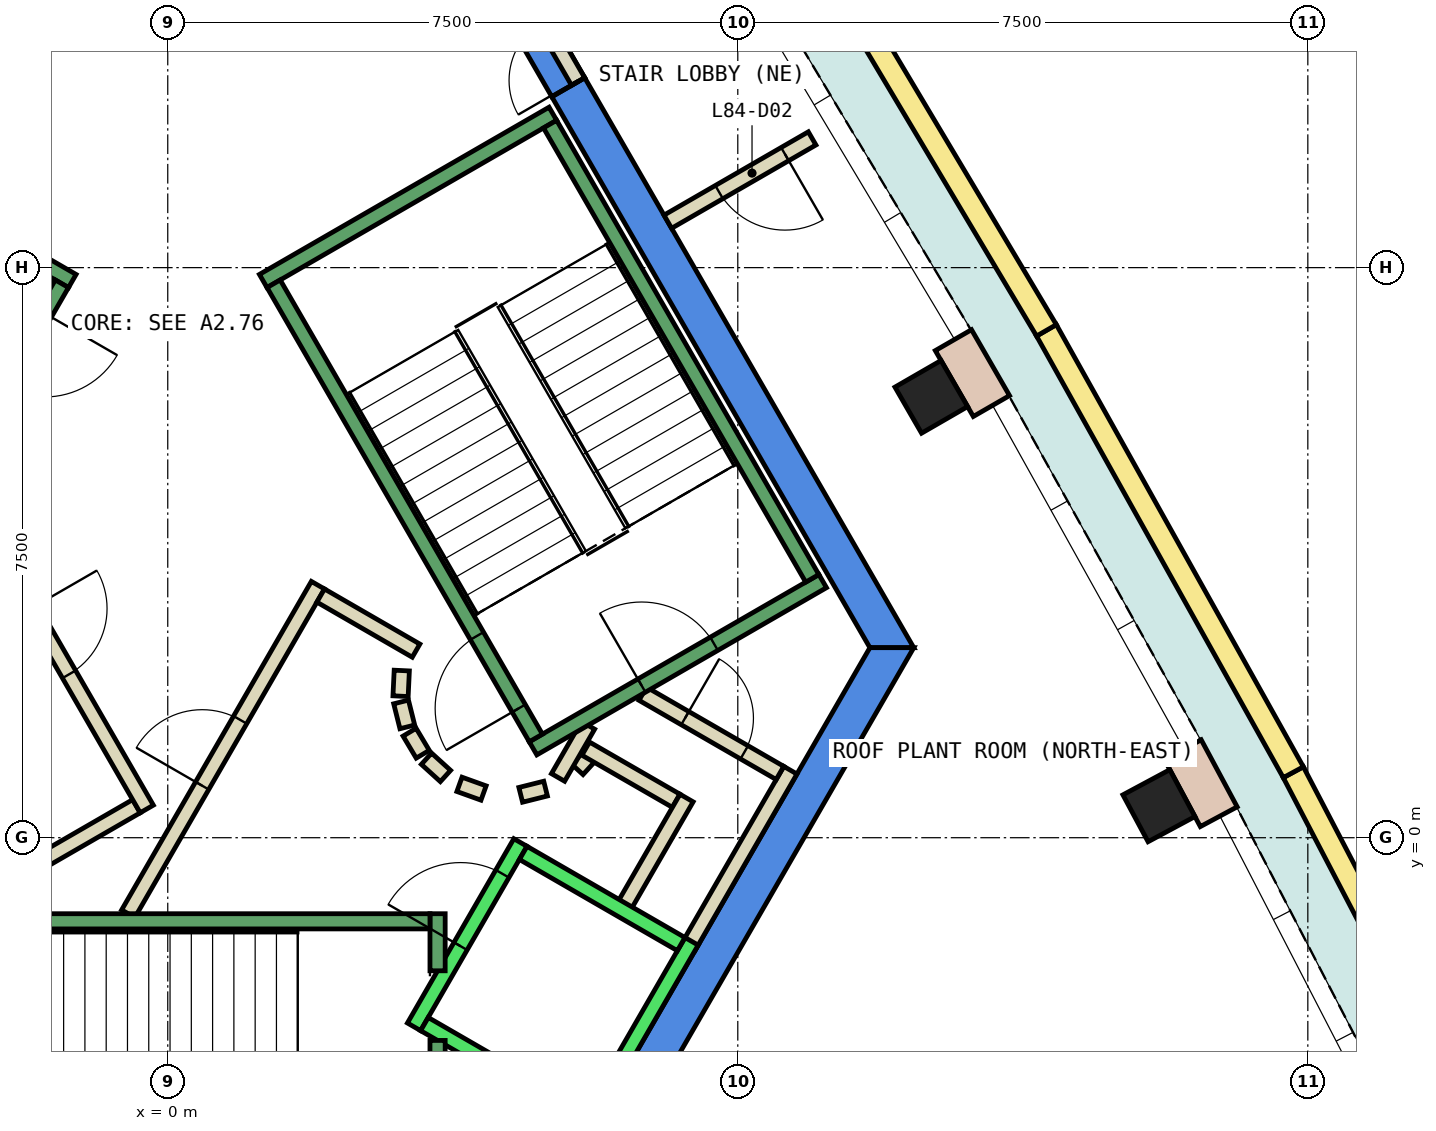
"""IFC4 building model, lengths in metres.
Left out: names, types, materials, properties, quantities, classifications, styles, units other than length and angle.
Written with IfcOpenShell. Run it as: python <this file> out.ifc"""

import sys

from ifc_helpers import new_model, si_unit, direction, frame, frame_2d, origin, origin_2d, place, context, subcontext, project, spatial, polyline, rectangle, outline, extrude, element, fill, save


model = new_model("IFC4")
c1 = context("Model", 3, precision=1e-05, world=origin(), true_north=direction((0.0, 1.0)))
c2 = subcontext(c1, "Body", "Model", "MODEL_VIEW")
j1 = project(units=[si_unit("LENGTHUNIT", "METRE"), si_unit("PLANEANGLEUNIT", "RADIAN")], contexts=[c1])
p1 = place(None, origin())
s1 = spatial("IfcSite", under=j1, at=p1, CompositionType="ELEMENT")
p2 = place(p1, origin())
s2 = spatial("IfcBuilding", under=s1, at=p2, CompositionType="ELEMENT")
p3 = place(p2, frame((0.0, 0.0, 358.4)))
s3 = spatial("IfcBuildingStorey", under=s2, at=p3, CompositionType="ELEMENT", Elevation=358.4)
for number, where, z_axis, x_axis in (
    (1, (13.041, 0.421, 0.0), (0.0, 0.0, 1.0), (-0.473, 0.881, 0.0)),
    (2, (10.046, 5.8, 0.0), (0.0, 0.0, 1.0), (-0.5, 0.866, 0.0)),
):
    element("IfcColumn", number, at=place(p3, frame(where, z_axis=z_axis, x_axis=x_axis)), inside=s3, PredefinedType="COLUMN", context=c2, shape_type="SweptSolid", body=[
        extrude(rectangle(XDim=0.7, YDim=0.7, at=origin_2d()), origin(), (0.0, 0.0, 1.0), 4.05),
    ])
p4 = place(p3, frame((0.0, 0.0, -0.45)))
e3 = element("IfcWall", 3, at=p4, inside=s3, PredefinedType="SHEAR", context=c2, shape_type="SweptSolid", body=[
    extrude(outline(polyline([(5.486, 9.998), (5.053, 9.748), (9.238, 2.5), (9.815, 2.5), (5.486, 9.998)])), origin(), (0.0, 0.0, 1.0), 4.5),
])
p5 = place(p3, frame((0.0, 0.0, 3.6)))
e4 = element("IfcWall", 4, at=p5, inside=s3, PredefinedType="SHEAR", context=c2, shape_type="SweptSolid", body=[
    extrude(outline(polyline([(5.022, 10.8), (4.677, 10.601), (4.619, 10.5), (5.053, 9.748), (5.486, 9.998), (5.022, 10.8)])), origin(), (0.0, 0.0, 1.0), 0.45),
])
p6 = place(p3, frame((0.0, 0.0, -0.45)))
e5 = element("IfcWall", 5, at=p6, inside=s3, PredefinedType="SHEAR", context=c2, shape_type="SweptSolid", body=[
    extrude(outline(polyline([(4.907, -6.0), (9.815, 2.5), (9.238, 2.5), (4.619, -5.5), (4.907, -6.0)])), origin(), (0.0, 0.0, 1.0), 4.5),
])
for number, where, z_axis, x_axis in (
    (6, (13.828, 0.276, 0.0), (0.0, 0.0, 1.0), (-0.472, 0.881, 0.0)),
    (7, (10.837, 5.679, 0.0), (0.0, 0.0, 1.0), (-0.5, 0.866, 0.0)),
):
    element("IfcWall", number, at=place(p3, frame(where, z_axis=z_axis, x_axis=x_axis)), inside=s3, PredefinedType="STANDARD", context=c2, shape_type="SweptSolid", body=[
        extrude(rectangle(XDim=1.001, YDim=0.55, at=frame_2d((0.5, 0.0))), origin(), (0.0, 0.0, 1.0), 4.05),
    ])
p7 = place(p3, origin())
e8 = element("IfcWall", 8, at=p7, inside=s3, PredefinedType="PARAPET", context=c2, shape_type="SweptSolid", body=[
    extrude(outline(polyline([(18.024, -4.974), (14.941, 0.933), (14.677, 0.79), (17.722, -5.044), (18.024, -4.974)])), origin(), (0.0, 0.0, 1.0), 1.1),
])
p8 = place(p3, origin())
e9 = element("IfcWall", 9, at=p8, inside=s3, PredefinedType="PARAPET", context=c2, shape_type="SweptSolid", body=[
    extrude(outline(polyline([(14.941, 0.933), (11.691, 6.75), (11.431, 6.6), (14.677, 0.79), (14.941, 0.933)])), origin(), (0.0, 0.0, 1.0), 1.1),
])
p9 = place(p3, origin())
e10 = element("IfcWall", 10, at=p9, inside=s3, PredefinedType="PARAPET", context=c2, shape_type="SweptSolid", body=[
    extrude(outline(polyline([(11.691, 6.75), (8.278, 12.473), (8.023, 12.316), (11.431, 6.6), (11.691, 6.75)])), origin(), (0.0, 0.0, 1.0), 1.1),
])
p10 = place(p3, frame((5.39, 0.898, 0.0), z_axis=(0.0, 0.0, 1.0), x_axis=(0.673828488714, 0.738887791073, 0.0)))
e11 = element("IfcWall", 11, at=p10, inside=s3, PredefinedType="PARTITIONING", context=c2, shape_type="SweptSolid", body=[
    extrude(rectangle(XDim=0.263, YDim=0.2, at=frame_2d((0.131, 0.0))), origin(), (0.0, 0.0, 1.0), 4.05),
])
p11 = place(p3, frame((5.499, 1.172, 0.0), z_axis=(0.0, 0.0, 1.0), x_axis=(0.866333505267, -0.499465972466, 0.0)))
e12 = element("IfcWall", 12, at=p11, inside=s3, PredefinedType="PARTITIONING", context=c2, shape_type="SweptSolid", body=[
    extrude(rectangle(XDim=1.374, YDim=0.2, at=frame_2d((0.687, 0.0))), origin(), (0.0, 0.0, 1.0), 4.05),
])
p12 = place(p3, frame((6.826, 0.522, 0.0), z_axis=(0.0, 0.0, 1.0), x_axis=(-0.500016722714, -0.866015748706, 0.0)))
e13 = element("IfcWall", 13, at=p12, inside=s3, PredefinedType="PARTITIONING", context=c2, shape_type="SweptSolid", body=[
    extrude(rectangle(XDim=1.7, YDim=0.2, at=frame_2d((0.85, 0.0))), origin(), (0.0, 0.0, 1.0), 4.05),
])
p13 = place(p3, frame((8.192, 0.888, 0.0), z_axis=(0.0, 0.0, 1.0), x_axis=(-0.499940625693, -0.866059680843, 0.0)))
e14 = element("IfcWall", 14, at=p13, inside=s3, PredefinedType="PARTITIONING", context=c2, shape_type="SweptSolid", body=[
    extrude(rectangle(XDim=2.68, YDim=0.2, at=frame_2d((1.34, 0.0))), origin(), (0.0, 0.0, 1.0), 4.05),
])
p14 = place(p3, frame((5.135, 0.793, 0.0), z_axis=(0.0, 0.0, 1.0), x_axis=(0.499526442893, 0.866298639529, 0.0)))
e15 = element("IfcWall", 15, at=p14, inside=s3, PredefinedType="PARTITIONING", context=c2, shape_type="SweptSolid", body=[
    extrude(rectangle(XDim=0.791, YDim=0.2, at=frame_2d((0.396, 0.0))), origin(), (0.0, 0.0, 1.0), 4.05),
])
p15 = place(p3, frame((6.25, 1.894, 0.0), z_axis=(0.0, 0.0, 1.0), x_axis=(0.866043184279, -0.499969202016, 0.0)))
e16 = element("IfcWall", 16, at=p15, inside=s3, PredefinedType="PARTITIONING", context=c2, shape_type="SweptSolid", body=[
    extrude(rectangle(XDim=2.084, YDim=0.2, at=frame_2d((1.042, 0.0))), origin(), (0.0, 0.0, 1.0), 4.05),
])
p16 = place(p15, frame((0.642, 0.0, 0.0)))
e17 = element("IfcOpeningElement", 17, at=p16, cuts=e16, PredefinedType="OPENING", context=c2, shape_type="SweptSolid", body=[
    extrude(rectangle(XDim=0.9, YDim=2.1, at=frame_2d((0.45, 1.05))), frame((0.0, 0.11, 0.0), z_axis=(0.0, -1.0, 0.0), x_axis=(1.0, 0.0, 0.0)), (0.0, 0.0, 1.0), 0.22),
])
p17 = place(p3, frame((3.079, 2.199, 0.0), z_axis=(0.0, 0.0, 1.0), x_axis=(-0.047771483479, -0.998858290933, 0.0)))
e18 = element("IfcWall", 18, at=p17, inside=s3, PredefinedType="PARTITIONING", context=c2, shape_type="SweptSolid", body=[
    extrude(rectangle(XDim=0.337, YDim=0.2, at=frame_2d((0.169, 0.0))), origin(), (0.0, 0.0, 1.0), 4.05),
])
p18 = place(p3, frame((3.07, 1.786, 0.0), z_axis=(0.0, 0.0, 1.0), x_axis=(0.242705583207, -0.970099994784, 0.0)))
e19 = element("IfcWall", 19, at=p18, inside=s3, PredefinedType="PARTITIONING", context=c2, shape_type="SweptSolid", body=[
    extrude(rectangle(XDim=0.338, YDim=0.2, at=frame_2d((0.169, 0.0))), origin(), (0.0, 0.0, 1.0), 4.05),
])
for number, where, z_axis, x_axis in (
    (20, (3.182, 1.388, 0.0), (0.0, 0.0, 1.0), (0.512, -0.859, 0.0)),
    (21, (3.404, 1.039, 0.0), (0.0, 0.0, 1.0), (0.74, -0.672, 0.0)),
):
    element("IfcWall", number, at=place(p3, frame(where, z_axis=z_axis, x_axis=x_axis)), inside=s3, PredefinedType="PARTITIONING", context=c2, shape_type="SweptSolid", body=[
        extrude(rectangle(XDim=0.338, YDim=0.2, at=frame_2d((0.169, 0.0))), origin(), (0.0, 0.0, 1.0), 4.05),
    ])
p19 = place(p3, frame((3.838, 0.702, 0.0), z_axis=(0.0, 0.0, 1.0), x_axis=(0.941035081519, -0.338308993895, 0.0)))
e22 = element("IfcWall", 22, at=p19, inside=s3, PredefinedType="PARTITIONING", context=c2, shape_type="SweptSolid", body=[
    extrude(rectangle(XDim=0.337, YDim=0.2, at=frame_2d((0.168, 0.0))), origin(), (0.0, 0.0, 1.0), 4.05),
])
p20 = place(p3, frame((4.644, 0.564, 0.0), z_axis=(0.0, 0.0, 1.0), x_axis=(0.969929076366, 0.243387729394, 0.0)))
e23 = element("IfcWall", 23, at=p20, inside=s3, PredefinedType="PARTITIONING", context=c2, shape_type="SweptSolid", body=[
    extrude(rectangle(XDim=0.337, YDim=0.2, at=frame_2d((0.168, 0.0))), origin(), (0.0, 0.0, 1.0), 4.05),
])
p21 = place(p3, frame((-0.52, -1.0, 0.0), z_axis=(0.0, 0.0, 1.0), x_axis=(0.50011622646, 0.865958290007, 0.0)))
e24 = element("IfcWall", 24, at=p21, inside=s3, PredefinedType="PARTITIONING", context=c2, shape_type="SweptSolid", body=[
    extrude(rectangle(XDim=4.991, YDim=0.2, at=frame_2d((2.496, 0.0))), origin(), (0.0, 0.0, 1.0), 4.05),
])
p22 = place(p21, frame((1.945, 0.0, 0.0)))
e25 = element("IfcOpeningElement", 25, at=p22, cuts=e24, PredefinedType="OPENING", context=c2, shape_type="SweptSolid", body=[
    extrude(rectangle(XDim=1.0, YDim=2.1, at=frame_2d((0.5, 1.05))), frame((0.0, 0.11, 0.0), z_axis=(0.0, -1.0, 0.0), x_axis=(1.0, 0.0, 0.0)), (0.0, 0.0, 1.0), 0.22),
])
p23 = place(p3, frame((2.012, 3.186, 0.0), z_axis=(0.0, 0.0, 1.0), x_axis=(0.865891012941, -0.500232699559, 0.0)))
e26 = element("IfcWall", 26, at=p23, inside=s3, PredefinedType="PARTITIONING", context=c2, shape_type="SweptSolid", body=[
    extrude(rectangle(XDim=1.449, YDim=0.2, at=frame_2d((0.725, 0.0))), origin(), (0.0, 0.0, 1.0), 4.05),
])
p24 = place(p3, frame((-0.412, 0.414, 0.0), z_axis=(0.0, 0.0, 1.0), x_axis=(-0.866017369001, -0.500013916395, 0.0)))
e27 = element("IfcWall", 27, at=p24, inside=s3, PredefinedType="PARTITIONING", context=c2, shape_type="SweptSolid", body=[
    extrude(rectangle(XDim=1.45, YDim=0.2, at=frame_2d((0.725, 0.0))), origin(), (0.0, 0.0, 1.0), 4.05),
])
p25 = place(p3, frame((-2.771, 4.7, 0.0), z_axis=(0.0, 0.0, 1.0), x_axis=(0.499969479948, -0.866043023828, 0.0)))
e28 = element("IfcWall", 28, at=p25, inside=s3, PredefinedType="PARTITIONING", context=c2, shape_type="SweptSolid", body=[
    extrude(rectangle(XDim=4.99, YDim=0.2, at=frame_2d((2.495, 0.0))), origin(), (0.0, 0.0, 1.0), 4.05),
])
p26 = place(p25, frame((1.945, 0.0, 0.0)))
e29 = element("IfcOpeningElement", 29, at=p26, cuts=e28, PredefinedType="OPENING", context=c2, shape_type="SweptSolid", body=[
    extrude(rectangle(XDim=1.0, YDim=2.1, at=frame_2d((0.5, 1.05))), frame((0.0, 0.11, 0.0), z_axis=(0.0, -1.0, 0.0), x_axis=(1.0, 0.0, 0.0)), (0.0, 0.0, 1.0), 0.22),
])
p27 = place(p3, frame((8.478, 9.2, 0.0), z_axis=(0.0, 0.0, 1.0), x_axis=(-0.866104006239, -0.499863831834, 0.0)))
e30 = element("IfcWall", 30, at=p27, inside=s3, PredefinedType="PARTITIONING", context=c2, shape_type="SweptSolid", body=[
    extrude(rectangle(XDim=2.192, YDim=0.2, at=frame_2d((1.096, 0.0))), origin(), (0.0, 0.0, 1.0), 4.05),
])
p28 = place(p27, frame((0.413, 0.0, 0.0)))
e31 = element("IfcOpeningElement", 31, at=p28, cuts=e30, PredefinedType="OPENING", context=c2, shape_type="SweptSolid", body=[
    extrude(rectangle(XDim=1.0, YDim=2.1, at=frame_2d((0.5, 1.05))), frame((0.0, 0.11, 0.0), z_axis=(0.0, -1.0, 0.0), x_axis=(1.0, 0.0, 0.0)), (0.0, 0.0, 1.0), 0.22),
])
p29 = place(p3, frame((5.399, 9.948, 0.0), z_axis=(0.0, 0.0, 1.0), x_axis=(-0.499882215713, 0.866093395895, 0.0)))
e32 = element("IfcWall", 32, at=p29, inside=s3, PredefinedType="PARTITIONING", context=c2, shape_type="SweptSolid", body=[
    extrude(rectangle(XDim=0.926, YDim=0.2, at=frame_2d((0.463, 0.0))), origin(), (0.0, 0.0, 1.0), 2.4),
])
p30 = place(p29, frame((0.017, 0.0, 0.0)))
e33 = element("IfcOpeningElement", 33, at=p30, cuts=e32, PredefinedType="OPENING", context=c2, shape_type="SweptSolid", body=[
    extrude(rectangle(XDim=0.9, YDim=2.1, at=frame_2d((0.45, 1.05))), frame((0.0, 0.11, 0.0), z_axis=(0.0, -1.0, 0.0), x_axis=(1.0, 0.0, 0.0)), (0.0, 0.0, 1.0), 0.22),
])
p31 = place(p3, frame((3.24, -2.488, 0.0), z_axis=(0.0, 0.0, 1.0), x_axis=(0.49994636267, 0.866056369097, 0.0)))
e34 = element("IfcWall", 34, at=p31, inside=s3, PredefinedType="STANDARD", context=c2, shape_type="SweptSolid", body=[
    extrude(rectangle(XDim=2.8, YDim=0.2, at=frame_2d((1.4, 0.0))), origin(), (0.0, 0.0, 1.0), 4.05),
])
p32 = place(p31, frame((1.225, 0.0, 0.0)))
e35 = element("IfcOpeningElement", 35, at=p32, cuts=e34, PredefinedType="OPENING", context=c2, shape_type="SweptSolid", body=[
    extrude(rectangle(XDim=1.1, YDim=2.1, at=frame_2d((0.55, 1.05))), frame((0.0, 0.11, 0.0), z_axis=(0.0, -1.0, 0.0), x_axis=(1.0, 0.0, 0.0)), (0.0, 0.0, 1.0), 0.22),
])
p33 = place(p3, frame((5.492, -3.788, 0.0), z_axis=(0.0, 0.0, 1.0), x_axis=(0.500011755427, 0.866018616679, 0.0)))
e36 = element("IfcWall", 36, at=p33, inside=s3, PredefinedType="STANDARD", context=c2, shape_type="SweptSolid", body=[
    extrude(rectangle(XDim=2.8, YDim=0.2, at=frame_2d((1.4, 0.0))), origin(), (0.0, 0.0, 1.0), 4.05),
])
p34 = place(p3, frame((3.377, -2.452, 0.0), z_axis=(0.0, 0.0, 1.0), x_axis=(0.865955154139, -0.50012165622, 0.0)))
e37 = element("IfcWall", 37, at=p34, inside=s3, PredefinedType="STANDARD", context=c2, shape_type="SweptSolid", body=[
    extrude(rectangle(XDim=2.4, YDim=0.2, at=frame_2d((1.2, 0.0))), origin(), (0.0, 0.0, 1.0), 4.05),
])
p35 = place(p3, frame((4.677, -0.2, 0.0), z_axis=(0.0, 0.0, 1.0), x_axis=(0.865973769406, -0.500089422704, 0.0)))
e38 = element("IfcWall", 38, at=p35, inside=s3, PredefinedType="STANDARD", context=c2, shape_type="SweptSolid", body=[
    extrude(rectangle(XDim=2.399, YDim=0.2, at=frame_2d((1.2, 0.0))), origin(), (0.0, 0.0, 1.0), 4.05),
])
p36 = place(p3, frame((3.55, -2.667, 0.0), z_axis=(0.0, 0.0, 1.0), x_axis=(0.0, -1.0, 0.0)))
e39 = element("IfcWall", 39, at=p36, inside=s3, PredefinedType="STANDARD", context=c2, shape_type="SweptSolid", body=[
    extrude(rectangle(XDim=2.733, YDim=0.2, at=frame_2d((1.366, 0.0))), origin(), (0.0, 0.0, 1.0), 4.05),
])
p37 = place(p3, frame((3.55, -1.0, 0.0), z_axis=(0.0, 0.0, 1.0), x_axis=(0.0, -1.0, 0.0)))
e40 = element("IfcWall", 40, at=p37, inside=s3, PredefinedType="STANDARD", context=c2, shape_type="SweptSolid", body=[
    extrude(rectangle(XDim=0.751, YDim=0.2, at=frame_2d((0.375, 0.0))), origin(), (0.0, 0.0, 1.0), 4.05),
])
p38 = place(p3, frame((-3.45, -1.1, 0.0), z_axis=(0.0, 0.0, 1.0), x_axis=(1.0, 0.0, 0.0)))
e41 = element("IfcWall", 41, at=p38, inside=s3, PredefinedType="STANDARD", context=c2, shape_type="SweptSolid", body=[
    extrude(rectangle(XDim=6.9, YDim=0.2, at=frame_2d((3.45, 0.0))), origin(), (0.0, 0.0, 1.0), 4.05),
])
p39 = place(p38, frame((0.45, 0.0, 0.0)))
e42 = element("IfcOpeningElement", 42, at=p39, cuts=e41, PredefinedType="OPENING", context=c2, shape_type="SweptSolid", body=[
    extrude(rectangle(XDim=1.1, YDim=2.2, at=frame_2d((0.55, 1.1))), frame((0.0, 0.11, 0.0), z_axis=(0.0, -1.0, 0.0), x_axis=(1.0, 0.0, 0.0)), (0.0, 0.0, 1.0), 0.22),
])
p40 = place(p3, frame((4.806, 1.176, 0.0), z_axis=(0.0, 0.0, 1.0), x_axis=(0.866059941101, 0.499940174841, 0.0)))
e43 = element("IfcWall", 43, at=p40, inside=s3, PredefinedType="STANDARD", context=c2, shape_type="SweptSolid", body=[
    extrude(rectangle(XDim=4.4, YDim=0.2, at=frame_2d((2.2, 0.0))), origin(), (0.0, 0.0, 1.0), 4.05),
])
p41 = place(p40, frame((1.65, 0.0, 0.0)))
e44 = element("IfcOpeningElement", 44, at=p41, cuts=e43, PredefinedType="OPENING", context=c2, shape_type="SweptSolid", body=[
    extrude(rectangle(XDim=1.1, YDim=2.2, at=frame_2d((0.55, 1.1))), frame((0.0, 0.11, 0.0), z_axis=(0.0, -1.0, 0.0), x_axis=(1.0, 0.0, 0.0)), (0.0, 0.0, 1.0), 0.22),
])
p42 = place(p3, frame((1.256, 7.324, 0.0), z_axis=(0.0, 0.0, 1.0), x_axis=(0.866046073146, 0.499964197906, 0.0)))
e45 = element("IfcWall", 45, at=p42, inside=s3, PredefinedType="STANDARD", context=c2, shape_type="SweptSolid", body=[
    extrude(rectangle(XDim=4.4, YDim=0.2, at=frame_2d((2.2, 0.0))), origin(), (0.0, 0.0, 1.0), 4.05),
])
p43 = place(p3, frame((4.843, 1.312, 0.0), z_axis=(0.0, 0.0, 1.0), x_axis=(-0.499963383562, 0.866046543262, 0.0)))
e46 = element("IfcWall", 46, at=p43, inside=s3, PredefinedType="STANDARD", context=c2, shape_type="SweptSolid", body=[
    extrude(rectangle(XDim=6.9, YDim=0.2, at=frame_2d((3.45, 0.0))), origin(), (0.0, 0.0, 1.0), 4.05),
])
p44 = place(p43, frame((0.45, 0.0, 0.0)))
e47 = element("IfcOpeningElement", 47, at=p44, cuts=e46, PredefinedType="OPENING", context=c2, shape_type="SweptSolid", body=[
    extrude(rectangle(XDim=1.1, YDim=2.2, at=frame_2d((0.55, 1.1))), frame((0.0, 0.11, 0.0), z_axis=(0.0, -1.0, 0.0), x_axis=(1.0, 0.0, 0.0)), (0.0, 0.0, 1.0), 0.22),
])
p45 = place(p3, frame((8.48, 3.412, 0.0), z_axis=(0.0, 0.0, 1.0), x_axis=(-0.499978703459, 0.866037698999, 0.0)))
e48 = element("IfcWall", 48, at=p45, inside=s3, PredefinedType="STANDARD", context=c2, shape_type="SweptSolid", body=[
    extrude(rectangle(XDim=6.9, YDim=0.2, at=frame_2d((3.45, 0.0))), origin(), (0.0, 0.0, 1.0), 4.05),
])
p46 = place(p3, frame((-1.256, 7.324, 0.0), z_axis=(0.0, 0.0, 1.0), x_axis=(-0.866046073146, 0.499964197906, 0.0)))
e49 = element("IfcWall", 49, at=p46, inside=s3, PredefinedType="STANDARD", context=c2, shape_type="SweptSolid", body=[
    extrude(rectangle(XDim=4.4, YDim=0.2, at=frame_2d((2.2, 0.0))), origin(), (0.0, 0.0, 1.0), 4.05),
])
p47 = place(p46, frame((1.65, 0.0, 0.0)))
e50 = element("IfcOpeningElement", 50, at=p47, cuts=e49, PredefinedType="OPENING", context=c2, shape_type="SweptSolid", body=[
    extrude(rectangle(XDim=1.1, YDim=2.2, at=frame_2d((0.55, 1.1))), frame((0.0, 0.11, 0.0), z_axis=(0.0, -1.0, 0.0), x_axis=(1.0, 0.0, 0.0)), (0.0, 0.0, 1.0), 0.22),
])
p48 = place(p3, frame((-1.393, 7.288, 0.0), z_axis=(0.0, 0.0, 1.0), x_axis=(-0.499963383562, -0.866046543262, 0.0)))
e51 = element("IfcWall", 51, at=p48, inside=s3, PredefinedType="STANDARD", context=c2, shape_type="SweptSolid", body=[
    extrude(rectangle(XDim=6.9, YDim=0.2, at=frame_2d((3.45, 0.0))), origin(), (0.0, 0.0, 1.0), 4.05),
])
p49 = place(p48, frame((0.45, 0.0, 0.0)))
e52 = element("IfcOpeningElement", 52, at=p49, cuts=e51, PredefinedType="OPENING", context=c2, shape_type="SweptSolid", body=[
    extrude(rectangle(XDim=1.1, YDim=2.2, at=frame_2d((0.55, 1.1))), frame((0.0, 0.11, 0.0), z_axis=(0.0, -1.0, 0.0), x_axis=(1.0, 0.0, 0.0)), (0.0, 0.0, 1.0), 0.22),
])
p50 = place(p28, origin())
e53 = element("IfcDoor", 53, at=p50, inside=s3, OperationType="SINGLE_SWING_LEFT", PredefinedType="DOOR", context=c2, shape_type="SweptSolid", body=[
    extrude(rectangle(XDim=1.0, YDim=2.1, at=frame_2d((0.5, 1.05))), frame((0.0, 0.025, 0.0), z_axis=(0.0, -1.0, 0.0), x_axis=(1.0, 0.0, 0.0)), (0.0, 0.0, 1.0), 0.05),
])
fill(e31, e53)
p51 = place(p22, origin())
e54 = element("IfcDoor", 54, at=p51, inside=s3, OperationType="SINGLE_SWING_LEFT", PredefinedType="DOOR", context=c2, shape_type="SweptSolid", body=[
    extrude(rectangle(XDim=1.0, YDim=2.1, at=frame_2d((0.5, 1.05))), frame((0.0, 0.025, 0.0), z_axis=(0.0, -1.0, 0.0), x_axis=(1.0, 0.0, 0.0)), (0.0, 0.0, 1.0), 0.05),
])
fill(e25, e54)
p52 = place(p26, origin())
e55 = element("IfcDoor", 55, at=p52, inside=s3, OperationType="SINGLE_SWING_RIGHT", PredefinedType="DOOR", context=c2, shape_type="SweptSolid", body=[
    extrude(rectangle(XDim=1.0, YDim=2.1, at=frame_2d((0.5, 1.05))), frame((0.0, 0.025, 0.0), z_axis=(0.0, -1.0, 0.0), x_axis=(1.0, 0.0, 0.0)), (0.0, 0.0, 1.0), 0.05),
])
fill(e29, e55)
p53 = place(p16, origin())
e56 = element("IfcDoor", 56, at=p53, inside=s3, OperationType="SINGLE_SWING_LEFT", PredefinedType="DOOR", context=c2, shape_type="SweptSolid", body=[
    extrude(rectangle(XDim=0.9, YDim=2.1, at=frame_2d((0.45, 1.05))), frame((0.0, 0.025, 0.0), z_axis=(0.0, -1.0, 0.0), x_axis=(1.0, 0.0, 0.0)), (0.0, 0.0, 1.0), 0.05),
])
fill(e17, e56)
p54 = place(p30, origin())
e57 = element("IfcDoor", 57, at=p54, inside=s3, OperationType="SINGLE_SWING_LEFT", PredefinedType="DOOR", context=c2, shape_type="SweptSolid", body=[
    extrude(rectangle(XDim=0.9, YDim=2.1, at=frame_2d((0.45, 1.05))), frame((0.0, 0.025, 0.0), z_axis=(0.0, -1.0, 0.0), x_axis=(1.0, 0.0, 0.0)), (0.0, 0.0, 1.0), 0.05),
])
fill(e33, e57)
p55 = place(p32, origin())
e58 = element("IfcDoor", 58, at=p55, inside=s3, OperationType="SLIDING_TO_LEFT", PredefinedType="DOOR", context=c2, shape_type="SweptSolid", body=[
    extrude(rectangle(XDim=1.1, YDim=2.1, at=frame_2d((0.55, 1.05))), frame((0.0, 0.025, 0.0), z_axis=(0.0, -1.0, 0.0), x_axis=(1.0, 0.0, 0.0)), (0.0, 0.0, 1.0), 0.05),
])
fill(e35, e58)
p56 = place(p44, origin())
e59 = element("IfcDoor", 59, at=p56, inside=s3, OperationType="SINGLE_SWING_LEFT", PredefinedType="DOOR", context=c2, shape_type="SweptSolid", body=[
    extrude(rectangle(XDim=1.1, YDim=2.2, at=frame_2d((0.55, 1.1))), frame((0.0, 0.025, 0.0), z_axis=(0.0, -1.0, 0.0), x_axis=(1.0, 0.0, 0.0)), (0.0, 0.0, 1.0), 0.05),
])
fill(e47, e59)
p57 = place(p41, origin())
e60 = element("IfcDoor", 60, at=p57, inside=s3, OperationType="SINGLE_SWING_LEFT", PredefinedType="DOOR", context=c2, shape_type="SweptSolid", body=[
    extrude(rectangle(XDim=1.1, YDim=2.2, at=frame_2d((0.55, 1.1))), frame((0.0, 0.025, 0.0), z_axis=(0.0, -1.0, 0.0), x_axis=(1.0, 0.0, 0.0)), (0.0, 0.0, 1.0), 0.05),
])
fill(e44, e60)
save(model, sys.argv[1])
